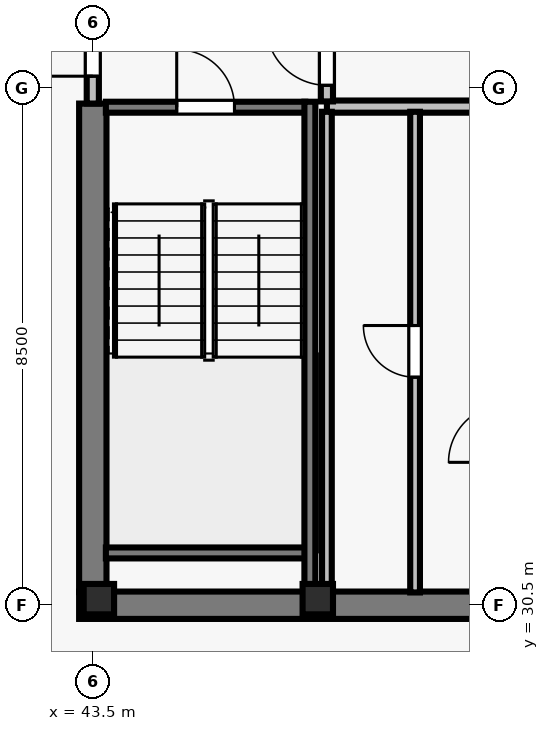
"""IFC4 building model, lengths in metres.
Left out: names, types, materials, properties, quantities, classifications, styles, units other than length and angle.
Written with IfcOpenShell. Run it as: python <this file> out.ifc"""

import sys

from ifc_helpers import new_model, si_unit, direction, frame, frame_2d, origin, origin_2d, place, context, subcontext, project, spatial, rectangle, i_section, extrude, element, fill, save


model = new_model("IFC4")
c1 = context("Model", 3, precision=1e-05, world=origin(), true_north=direction((0.0, 1.0)))
c2 = subcontext(c1, "Body", "Model", "MODEL_VIEW")
j1 = project(units=[si_unit("LENGTHUNIT", "METRE"), si_unit("PLANEANGLEUNIT", "RADIAN")], contexts=[c1])
p1 = place(None, origin())
s1 = spatial("IfcSite", under=j1, at=p1, CompositionType="ELEMENT")
p2 = place(p1, origin())
s2 = spatial("IfcBuilding", under=s1, at=p2, CompositionType="ELEMENT")
p3 = place(p2, frame((0.0, 0.0, 312.0)))
s3 = spatial("IfcBuildingStorey", under=s2, at=p3, CompositionType="ELEMENT", Elevation=312.0)
for number, where, z_axis, x_axis in (
    (1, (43.6, 30.6, 0.0), (0.0, 0.0, 1.0), (1.0, 0.0, 0.0)),
    (2, (47.2, 30.6, 0.0), (0.0, 0.0, 1.0), (1.0, 0.0, 0.0)),
):
    element("IfcColumn", number, at=place(p3, frame(where, z_axis=z_axis, x_axis=x_axis)), inside=s3, PredefinedType="COLUMN", context=c2, shape_type="SweptSolid", body=[
        extrude(i_section(OverallWidth=0.5, OverallDepth=0.5, WebThickness=0.028, FlangeThickness=0.045, at=origin_2d()), origin(), (0.0, 0.0, 1.0), 3.5),
    ])
p4 = place(p3, frame((43.275, 30.5, 0.0), z_axis=(0.0, 0.0, 1.0), x_axis=(1.0, 0.0, 0.0)))
e3 = element("IfcWall", 3, at=p4, inside=s3, PredefinedType="SHEAR", context=c2, shape_type="SweptSolid", body=[
    extrude(rectangle(XDim=17.45, YDim=0.45, at=frame_2d((8.725, 0.0))), origin(), (0.0, 0.0, 1.0), 3.29),
])
p5 = place(p3, frame((43.5, 30.715, 0.0), z_axis=(0.0, 0.0, 1.0), x_axis=(0.0, 1.0, 0.0)))
e4 = element("IfcWall", 4, at=p5, inside=s3, PredefinedType="SHEAR", context=c2, shape_type="SweptSolid", body=[
    extrude(rectangle(XDim=8.035, YDim=0.45, at=frame_2d((4.018, 0.0))), origin(), (0.0, 0.0, 1.0), 3.29),
])
p6 = place(p3, frame((47.35, 38.7, 0.0), z_axis=(0.0, 0.0, 1.0), x_axis=(1.0, 0.0, 0.0)))
e5 = element("IfcWall", 5, at=p6, inside=s3, PredefinedType="SOLIDWALL", context=c2, shape_type="SweptSolid", body=[
    extrude(rectangle(XDim=2.95, YDim=0.2, at=frame_2d((1.475, 0.0))), origin(), (0.0, 0.0, 1.0), 3.29),
])
p7 = place(p3, frame((43.5, 38.75, 0.0), z_axis=(0.0, 0.0, 1.0), x_axis=(0.0, 1.0, 0.0)))
e6 = element("IfcWall", 6, at=p7, inside=s3, PredefinedType="SOLIDWALL", context=c2, shape_type="SweptSolid", body=[
    extrude(rectangle(XDim=2.05, YDim=0.2, at=frame_2d((1.025, 0.0))), origin(), (0.0, 0.0, 1.0), 3.29),
])
p8 = place(p7, frame((0.45, 0.0, 0.0)))
e7 = element("IfcOpeningElement", 7, at=p8, cuts=e6, PredefinedType="OPENING", context=c2, shape_type="SweptSolid", body=[
    extrude(rectangle(XDim=1.1, YDim=2.15, at=frame_2d((0.55, 1.075))), frame((0.0, 0.11, 0.0), z_axis=(0.0, -1.0, 0.0), x_axis=(1.0, 0.0, 0.0)), (0.0, 0.0, 1.0), 0.22),
])
p9 = place(p3, frame((47.35, 38.785, 0.0), z_axis=(0.0, 0.0, 1.0), x_axis=(0.0, 1.0, 0.0)))
e8 = element("IfcWall", 8, at=p9, inside=s3, PredefinedType="SOLIDWALL", context=c2, shape_type="SweptSolid", body=[
    extrude(rectangle(XDim=4.865, YDim=0.2, at=frame_2d((2.433, 0.0))), origin(), (0.0, 0.0, 1.0), 3.29),
])
p10 = place(p9, frame((0.265, 0.0, 0.0)))
e9 = element("IfcOpeningElement", 9, at=p10, cuts=e8, PredefinedType="OPENING", context=c2, shape_type="SweptSolid", body=[
    extrude(rectangle(XDim=1.0, YDim=2.15, at=frame_2d((0.5, 1.075))), frame((0.0, 0.11, 0.0), z_axis=(0.0, -1.0, 0.0), x_axis=(1.0, 0.0, 0.0)), (0.0, 0.0, 1.0), 0.22),
])
p11 = place(p3, frame((47.35, 30.71, 0.0), z_axis=(0.0, 0.0, 1.0), x_axis=(0.0, 1.0, 0.0)))
e10 = element("IfcWall", 10, at=p11, inside=s3, PredefinedType="PARTITIONING", context=c2, shape_type="SweptSolid", body=[
    extrude(rectangle(XDim=7.905, YDim=0.16, at=frame_2d((3.953, 0.0))), origin(), (0.0, 0.0, 1.0), 3.29),
])
p12 = place(p3, frame((48.8, 30.71, 0.0), z_axis=(0.0, 0.0, 1.0), x_axis=(0.0, 1.0, 0.0)))
e11 = element("IfcWall", 11, at=p12, inside=s3, PredefinedType="PARTITIONING", context=c2, shape_type="SweptSolid", body=[
    extrude(rectangle(XDim=7.905, YDim=0.16, at=frame_2d((3.953, 0.0))), origin(), (0.0, 0.0, 1.0), 3.29),
])
p13 = place(p12, frame((3.54, 0.0, 0.0)))
e12 = element("IfcOpeningElement", 12, at=p13, cuts=e11, PredefinedType="OPENING", context=c2, shape_type="SweptSolid", body=[
    extrude(rectangle(XDim=0.85, YDim=2.12, at=frame_2d((0.425, 1.06))), frame((0.0, 0.09, 0.0), z_axis=(0.0, -1.0, 0.0), x_axis=(1.0, 0.0, 0.0)), (0.0, 0.0, 1.0), 0.18),
])
p14 = place(p3, frame((43.715, 38.69, 0.0), z_axis=(0.0, 0.0, 1.0), x_axis=(1.0, 0.0, 0.0)))
e13 = element("IfcWall", 13, at=p14, inside=s3, PredefinedType="SOLIDWALL", context=c2, shape_type="SweptSolid", body=[
    extrude(rectangle(XDim=3.28, YDim=0.18, at=frame_2d((1.64, 0.0))), origin(), (0.0, 0.0, 1.0), 3.29),
])
p15 = place(p14, frame((1.165, 0.0, 0.0)))
e14 = element("IfcOpeningElement", 14, at=p15, cuts=e13, PredefinedType="OPENING", context=c2, shape_type="SweptSolid", body=[
    extrude(rectangle(XDim=0.95, YDim=2.15, at=frame_2d((0.475, 1.075))), frame((0.0, 0.1, 0.0), z_axis=(0.0, -1.0, 0.0), x_axis=(1.0, 0.0, 0.0)), (0.0, 0.0, 1.0), 0.2),
])
p16 = place(p3, frame((43.715, 31.36, 0.0), z_axis=(0.0, 0.0, 1.0), x_axis=(1.0, 0.0, 0.0)))
e15 = element("IfcWall", 15, at=p16, inside=s3, PredefinedType="SOLIDWALL", context=c2, shape_type="SweptSolid", body=[
    extrude(rectangle(XDim=3.28, YDim=0.18, at=frame_2d((1.64, 0.0))), origin(), (0.0, 0.0, 1.0), 3.29),
])
p17 = place(p3, frame((47.07, 38.78, 0.0), z_axis=(0.0, 0.0, 1.0), x_axis=(0.0, -1.0, 0.0)))
e16 = element("IfcWall", 16, at=p17, inside=s3, PredefinedType="SOLIDWALL", context=c2, shape_type="SweptSolid", body=[
    extrude(rectangle(XDim=8.067, YDim=0.18, at=frame_2d((4.034, 0.0))), origin(), (0.0, 0.0, 1.0), 3.29),
])
p18 = place(p8, origin())
e17 = element("IfcDoor", 17, at=p18, inside=s3, OperationType="SINGLE_SWING_LEFT", PredefinedType="DOOR", context=c2, shape_type="SweptSolid", body=[
    extrude(rectangle(XDim=1.1, YDim=2.15, at=frame_2d((0.55, 1.075))), frame((0.0, 0.025, 0.0), z_axis=(0.0, -1.0, 0.0), x_axis=(1.0, 0.0, 0.0)), (0.0, 0.0, 1.0), 0.05),
])
fill(e7, e17)
p19 = place(p10, origin())
e18 = element("IfcDoor", 18, at=p19, inside=s3, OperationType="SINGLE_SWING_RIGHT", PredefinedType="DOOR", context=c2, shape_type="SweptSolid", body=[
    extrude(rectangle(XDim=1.0, YDim=2.15, at=frame_2d((0.5, 1.075))), frame((0.0, 0.025, 0.0), z_axis=(0.0, -1.0, 0.0), x_axis=(1.0, 0.0, 0.0)), (0.0, 0.0, 1.0), 0.05),
])
fill(e9, e18)
p20 = place(p13, origin())
e19 = element("IfcDoor", 19, at=p20, inside=s3, OperationType="SINGLE_SWING_RIGHT", PredefinedType="DOOR", context=c2, shape_type="SweptSolid", body=[
    extrude(rectangle(XDim=0.85, YDim=2.12, at=frame_2d((0.425, 1.06))), frame((0.0, 0.025, 0.0), z_axis=(0.0, -1.0, 0.0), x_axis=(1.0, 0.0, 0.0)), (0.0, 0.0, 1.0), 0.05),
])
fill(e12, e19)
p21 = place(p15, origin())
e20 = element("IfcDoor", 20, at=p21, inside=s3, OperationType="SINGLE_SWING_LEFT", PredefinedType="DOOR", context=c2, shape_type="SweptSolid", body=[
    extrude(rectangle(XDim=0.95, YDim=2.15, at=frame_2d((0.475, 1.075))), frame((0.0, 0.025, 0.0), z_axis=(0.0, -1.0, 0.0), x_axis=(1.0, 0.0, 0.0)), (0.0, 0.0, 1.0), 0.05),
])
fill(e14, e20)
save(model, sys.argv[1])
